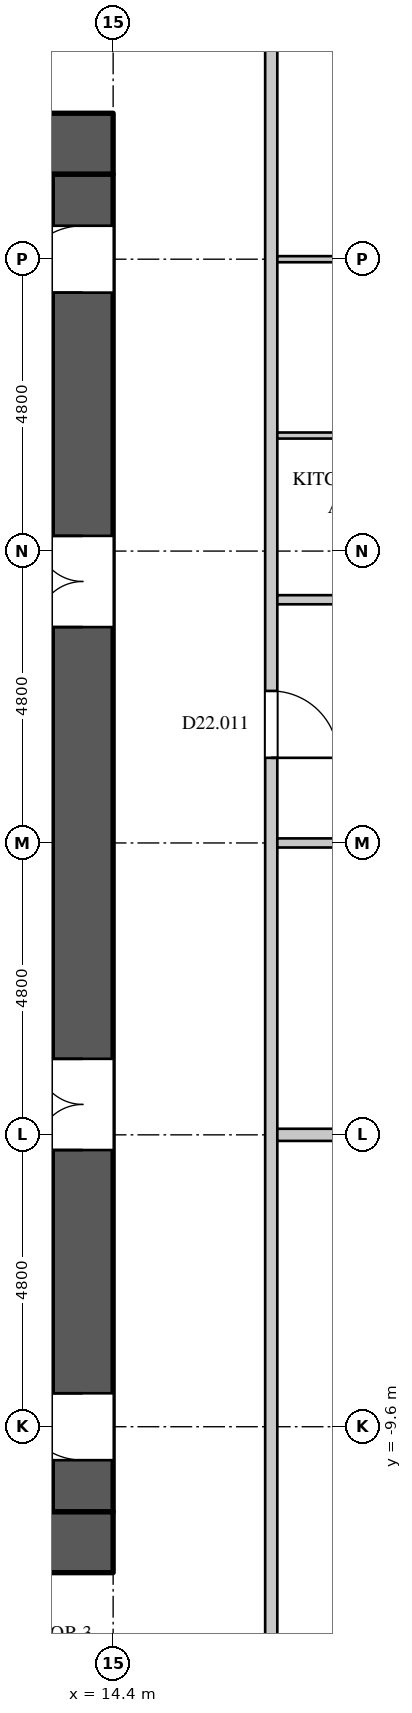
"""IFC4 building model, lengths in metres.
Left out: names, types, materials, properties, quantities, classifications, styles, units other than length and angle.
Written with IfcOpenShell. Run it as: python <this file> out.ifc"""

import sys

from ifc_helpers import new_model, si_unit, direction, frame, frame_2d, origin, place, context, subcontext, project, spatial, rectangle, extrude, element, fill, save


model = new_model("IFC4")
c1 = context("Model", 3, precision=1e-05, world=origin(), true_north=direction((0.0, 1.0)))
c2 = subcontext(c1, "Body", "Model", "MODEL_VIEW")
j1 = project(units=[si_unit("LENGTHUNIT", "METRE"), si_unit("PLANEANGLEUNIT", "RADIAN")], contexts=[c1])
p1 = place(None, origin())
s1 = spatial("IfcSite", under=j1, at=p1, CompositionType="ELEMENT")
p2 = place(p1, origin())
s2 = spatial("IfcBuilding", under=s1, at=p2, CompositionType="ELEMENT")
p3 = place(p2, frame((0.0, 0.0, 96.9)))
s3 = spatial("IfcBuildingStorey", under=s2, at=p3, CompositionType="ELEMENT", Elevation=96.9)
for number, where, z_axis, x_axis in (
    (1, (-14.4, 11.5, 0.0), (0.0, 0.0, 1.0), (1.0, 0.0, 0.0)),
    (2, (-14.4, -11.5, 0.0), (0.0, 0.0, 1.0), (1.0, 0.0, 0.0)),
):
    element("IfcWall", number, at=place(p3, frame(where, z_axis=z_axis, x_axis=x_axis)), inside=s3, PredefinedType="SHEAR", context=c2, shape_type="SweptSolid", body=[
        extrude(rectangle(XDim=28.8, YDim=1.0, at=frame_2d((14.4, 0.0))), origin(), (0.0, 0.0, 1.0), 4.2),
    ])
p4 = place(p3, frame((13.9, -11.0, 0.0), z_axis=(0.0, 0.0, 1.0), x_axis=(0.0, 1.0, 0.0)))
e3 = element("IfcWall", 3, at=p4, inside=s3, PredefinedType="SHEAR", context=c2, shape_type="SweptSolid", body=[
    extrude(rectangle(XDim=22.0, YDim=1.0, at=frame_2d((11.0, 0.0))), origin(), (0.0, 0.0, 1.0), 4.2),
])
p5 = place(p4, frame((20.05, 0.0, 0.0)))
e4 = element("IfcOpeningElement", 4, at=p5, cuts=e3, PredefinedType="OPENING", context=c2, shape_type="SweptSolid", body=[
    extrude(rectangle(XDim=1.1, YDim=2.2, at=frame_2d((0.55, 1.1))), frame((0.0, 0.51, 0.0), z_axis=(0.0, -1.0, 0.0), x_axis=(1.0, 0.0, 0.0)), (0.0, 0.0, 1.0), 1.02),
])
p6 = place(p4, frame((0.85, 0.0, 0.0)))
e5 = element("IfcOpeningElement", 5, at=p6, cuts=e3, PredefinedType="OPENING", context=c2, shape_type="SweptSolid", body=[
    extrude(rectangle(XDim=1.1, YDim=2.2, at=frame_2d((0.55, 1.1))), frame((0.0, 0.51, 0.0), z_axis=(0.0, -1.0, 0.0), x_axis=(1.0, 0.0, 0.0)), (0.0, 0.0, 1.0), 1.02),
])
p7 = place(p4, frame((14.55, 0.0, 0.0)))
e6 = element("IfcOpeningElement", 6, at=p7, cuts=e3, PredefinedType="OPENING", context=c2, shape_type="SweptSolid", body=[
    extrude(rectangle(XDim=1.5, YDim=2.4, at=frame_2d((0.75, 1.2))), frame((0.0, 0.51, 0.0), z_axis=(0.0, -1.0, 0.0), x_axis=(1.0, 0.0, 0.0)), (0.0, 0.0, 1.0), 1.02),
])
p8 = place(p4, frame((5.95, 0.0, 0.0)))
e7 = element("IfcOpeningElement", 7, at=p8, cuts=e3, PredefinedType="OPENING", context=c2, shape_type="SweptSolid", body=[
    extrude(rectangle(XDim=1.5, YDim=2.4, at=frame_2d((0.75, 1.2))), frame((0.0, 0.51, 0.0), z_axis=(0.0, -1.0, 0.0), x_axis=(1.0, 0.0, 0.0)), (0.0, 0.0, 1.0), 1.02),
])
p9 = place(p3, frame((17.0, -14.5, 0.0), z_axis=(0.0, 0.0, 1.0), x_axis=(0.0, 1.0, 0.0)))
e8 = element("IfcWall", 8, at=p9, inside=s3, PredefinedType="PARTITIONING", context=c2, shape_type="SweptSolid", body=[
    extrude(rectangle(XDim=29.0, YDim=0.2, at=frame_2d((14.5, 0.0))), origin(), (0.0, 0.0, 1.0), 3.798),
])
p10 = place(p9, frame((15.9, 0.0, 0.0)))
e9 = element("IfcOpeningElement", 9, at=p10, cuts=e8, PredefinedType="OPENING", context=c2, shape_type="SweptSolid", body=[
    extrude(rectangle(XDim=1.1, YDim=2.4, at=frame_2d((0.55, 1.2))), frame((0.0, 0.11, 0.0), z_axis=(0.0, -1.0, 0.0), x_axis=(1.0, 0.0, 0.0)), (0.0, 0.0, 1.0), 0.22),
])
p11 = place(p3, frame((17.1, 0.0, 0.0), z_axis=(0.0, 0.0, 1.0), x_axis=(1.0, 0.0, 0.0)))
e10 = element("IfcWall", 10, at=p11, inside=s3, PredefinedType="PARTITIONING", context=c2, shape_type="SweptSolid", body=[
    extrude(rectangle(XDim=11.755, YDim=0.15, at=frame_2d((5.877, 0.0))), origin(), (0.0, 0.0, 1.0), 3.798),
])
p12 = place(p11, frame((1.8, 0.0, 0.0)))
e11 = element("IfcOpeningElement", 11, at=p12, cuts=e10, PredefinedType="OPENING", context=c2, shape_type="SweptSolid", body=[
    extrude(rectangle(XDim=0.95, YDim=2.2, at=frame_2d((0.475, 1.1))), frame((0.0, 0.085, 0.0), z_axis=(0.0, -1.0, 0.0), x_axis=(1.0, 0.0, 0.0)), (0.0, 0.0, 1.0), 0.17),
])
p13 = place(p3, frame((17.1, 4.0, 0.0), z_axis=(0.0, 0.0, 1.0), x_axis=(1.0, 0.0, 0.0)))
e12 = element("IfcWall", 12, at=p13, inside=s3, PredefinedType="PARTITIONING", context=c2, shape_type="SweptSolid", body=[
    extrude(rectangle(XDim=4.625, YDim=0.15, at=frame_2d((2.312, 0.0))), origin(), (0.0, 0.0, 1.0), 3.798),
])
p14 = place(p13, frame((1.85, 0.0, 0.0)))
e13 = element("IfcOpeningElement", 13, at=p14, cuts=e12, PredefinedType="OPENING", context=c2, shape_type="SweptSolid", body=[
    extrude(rectangle(XDim=0.95, YDim=2.2, at=frame_2d((0.475, 1.1))), frame((0.0, 0.085, 0.0), z_axis=(0.0, -1.0, 0.0), x_axis=(1.0, 0.0, 0.0)), (0.0, 0.0, 1.0), 0.17),
])
p15 = place(p3, frame((17.64, 17.64, 0.0), z_axis=(0.0, 0.0, 1.0), x_axis=(0.707106781187, -0.707106781187, 0.0)))
e14 = element("IfcWall", 14, at=p15, inside=s3, PredefinedType="PARTITIONING", context=c2, shape_type="SweptSolid", body=[
    extrude(rectangle(XDim=7.938, YDim=0.15, at=frame_2d((3.969, 0.0))), origin(), (0.0, 0.0, 1.0), 3.798),
])
p16 = place(p15, frame((6.8, 0.0, 0.0)))
e15 = element("IfcOpeningElement", 15, at=p16, cuts=e14, PredefinedType="OPENING", context=c2, shape_type="SweptSolid", body=[
    extrude(rectangle(XDim=0.95, YDim=2.2, at=frame_2d((0.475, 1.1))), frame((0.0, 0.085, 0.0), z_axis=(0.0, -1.0, 0.0), x_axis=(1.0, 0.0, 0.0)), (0.0, 0.0, 1.0), 0.17),
])
p17 = place(p15, frame((2.1, 0.0, 0.0)))
e16 = element("IfcOpeningElement", 16, at=p17, cuts=e14, PredefinedType="OPENING", context=c2, shape_type="SweptSolid", body=[
    extrude(rectangle(XDim=0.95, YDim=2.2, at=frame_2d((0.475, 1.1))), frame((0.0, 0.085, 0.0), z_axis=(0.0, -1.0, 0.0), x_axis=(1.0, 0.0, 0.0)), (0.0, 0.0, 1.0), 0.17),
])
p18 = place(p3, frame((17.1, -4.8, 0.0), z_axis=(0.0, 0.0, 1.0), x_axis=(1.0, 0.0, 0.0)))
e17 = element("IfcWall", 17, at=p18, inside=s3, PredefinedType="PARTITIONING", context=c2, shape_type="SweptSolid", body=[
    extrude(rectangle(XDim=10.8, YDim=0.2, at=frame_2d((5.4, 0.0))), origin(), (0.0, 0.0, 1.0), 3.1),
])
p19 = place(p3, frame((17.1, 6.7, 0.0), z_axis=(0.0, 0.0, 1.0), x_axis=(1.0, 0.0, 0.0)))
e18 = element("IfcWall", 18, at=p19, inside=s3, PredefinedType="PARTITIONING", context=c2, shape_type="SweptSolid", body=[
    extrude(rectangle(XDim=4.625, YDim=0.1, at=frame_2d((2.312, 0.0))), origin(), (0.0, 0.0, 1.0), 3.798),
])
p20 = place(p3, frame((17.1, 9.6, 0.0), z_axis=(0.0, 0.0, 1.0), x_axis=(1.0, 0.0, 0.0)))
e19 = element("IfcWall", 19, at=p20, inside=s3, PredefinedType="PARTITIONING", context=c2, shape_type="SweptSolid", body=[
    extrude(rectangle(XDim=4.7, YDim=0.1, at=frame_2d((2.35, 0.0))), origin(), (0.0, 0.0, 1.0), 3.798),
])
p21 = place(p20, frame((1.85, 0.0, 0.0)))
e20 = element("IfcOpeningElement", 20, at=p21, cuts=e19, PredefinedType="OPENING", context=c2, shape_type="SweptSolid", body=[
    extrude(rectangle(XDim=0.9, YDim=2.2, at=frame_2d((0.45, 1.1))), frame((0.0, 0.06, 0.0), z_axis=(0.0, -1.0, 0.0), x_axis=(1.0, 0.0, 0.0)), (0.0, 0.0, 1.0), 0.12),
])
p22 = place(p5, origin())
e21 = element("IfcDoor", 21, at=p22, inside=s3, OperationType="SINGLE_SWING_LEFT", PredefinedType="DOOR", context=c2, shape_type="SweptSolid", body=[
    extrude(rectangle(XDim=1.1, YDim=2.2, at=frame_2d((0.55, 1.1))), frame((0.0, 0.495, 0.0), z_axis=(0.0, -1.0, 0.0), x_axis=(1.0, 0.0, 0.0)), (0.0, 0.0, 1.0), 0.05),
])
fill(e4, e21)
p23 = place(p6, origin())
e22 = element("IfcDoor", 22, at=p23, inside=s3, OperationType="SINGLE_SWING_RIGHT", PredefinedType="DOOR", context=c2, shape_type="SweptSolid", body=[
    extrude(rectangle(XDim=1.1, YDim=2.2, at=frame_2d((0.55, 1.1))), frame((0.0, 0.495, 0.0), z_axis=(0.0, -1.0, 0.0), x_axis=(1.0, 0.0, 0.0)), (0.0, 0.0, 1.0), 0.05),
])
fill(e5, e22)
p24 = place(p7, origin())
e23 = element("IfcDoor", 23, at=p24, inside=s3, OperationType="DOUBLE_DOOR_SINGLE_SWING", PredefinedType="DOOR", context=c2, shape_type="SweptSolid", body=[
    extrude(rectangle(XDim=1.5, YDim=2.4, at=frame_2d((0.75, 1.2))), frame((0.0, 0.495, 0.0), z_axis=(0.0, -1.0, 0.0), x_axis=(1.0, 0.0, 0.0)), (0.0, 0.0, 1.0), 0.05),
])
fill(e6, e23)
p25 = place(p8, origin())
e24 = element("IfcDoor", 24, at=p25, inside=s3, OperationType="DOUBLE_DOOR_SINGLE_SWING", PredefinedType="DOOR", context=c2, shape_type="SweptSolid", body=[
    extrude(rectangle(XDim=1.5, YDim=2.4, at=frame_2d((0.75, 1.2))), frame((0.0, 0.495, 0.0), z_axis=(0.0, -1.0, 0.0), x_axis=(1.0, 0.0, 0.0)), (0.0, 0.0, 1.0), 0.05),
])
fill(e7, e24)
p26 = place(p10, origin())
e25 = element("IfcDoor", 25, at=p26, inside=s3, OperationType="SINGLE_SWING_RIGHT", PredefinedType="DOOR", context=c2, shape_type="SweptSolid", body=[
    extrude(rectangle(XDim=1.1, YDim=2.4, at=frame_2d((0.55, 1.2))), frame((0.0, 0.025, 0.0), z_axis=(0.0, -1.0, 0.0), x_axis=(1.0, 0.0, 0.0)), (0.0, 0.0, 1.0), 0.05),
])
fill(e9, e25)
save(model, sys.argv[1])
